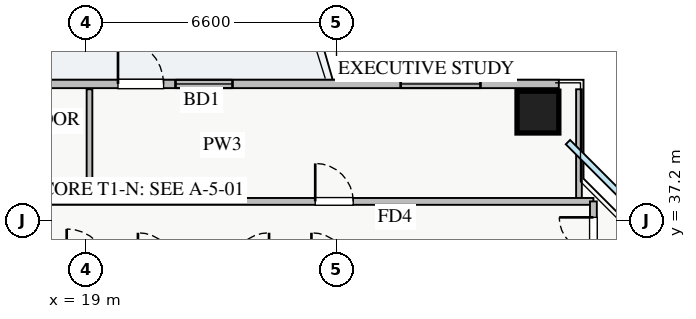
"""IFC4 building model, lengths in metres.
Left out: names, types, materials, properties, quantities, classifications, styles, units other than length and angle.
Written with IfcOpenShell. Run it as: python <this file> out.ifc"""

import sys

from ifc_helpers import new_model, si_unit, direction, frame, frame_2d, origin, origin_2d, place, context, subcontext, project, spatial, rectangle, extrude, source, transform, mapped, element, fill, save


model = new_model("IFC4")
c1 = context("Model", 3, precision=1e-05, world=origin(), true_north=direction((0.0, 1.0)))
c2 = subcontext(c1, "Body", "Model", "MODEL_VIEW")
j1 = project(units=[si_unit("LENGTHUNIT", "METRE"), si_unit("PLANEANGLEUNIT", "RADIAN")], contexts=[c1])
p1 = place(None, origin())
s1 = spatial("IfcSite", under=j1, at=p1, CompositionType="ELEMENT")
p2 = place(p1, origin())
s2 = spatial("IfcBuilding", under=s1, at=p2, CompositionType="ELEMENT")
p3 = place(p2, frame((0.0, 0.0, 106.75)))
s3 = spatial("IfcBuildingStorey", under=s2, at=p3, CompositionType="ELEMENT", Elevation=106.75)
m1 = source(origin(), c2, "Body", "SweptSolid", [
    extrude(rectangle(XDim=1.1, YDim=1.1, at=origin_2d()), origin(), (0.0, 0.0, 1.0), 3.25),
])
p4 = place(p3, frame((30.9, 40.05, 0.0), z_axis=(0.0, 0.0, 1.0), x_axis=(1.0, 0.0, 0.0)))
e1 = element("IfcColumn", 1, at=p4, inside=s3, PredefinedType="COLUMN", context=c2, shape_type="MappedRepresentation", body=[
    mapped(m1, transform((0.0, 0.0, 0.0), x_axis=(1.0, 0.0, 0.0), y_axis=(0.0, 1.0, 0.0), z_axis=(0.0, 0.0, 1.0), scale=1.0)),
])
p5 = place(p3, frame((6.55, 40.79, 0.0), z_axis=(0.0, 0.0, 1.0), x_axis=(1.0, 0.0, 0.0)))
e2 = element("IfcWall", 2, at=p5, inside=s3, PredefinedType="STANDARD", context=c2, shape_type="SweptSolid", body=[
    extrude(rectangle(XDim=24.9, YDim=0.22, at=frame_2d((12.45, 0.0))), origin(), (0.0, 0.0, 1.0), 2.61),
])
p6 = place(p5, frame((13.3, 0.0, 0.0)))
e3 = element("IfcOpeningElement", 3, at=p6, cuts=e2, PredefinedType="OPENING", context=c2, shape_type="SweptSolid", body=[
    extrude(rectangle(XDim=1.2, YDim=2.1, at=frame_2d((0.6, 1.05))), frame((0.0, 0.12, 0.0), z_axis=(0.0, -1.0, 0.0), x_axis=(1.0, 0.0, 0.0)), (0.0, 0.0, 1.0), 0.24),
])
p7 = place(p5, frame((0.357, 0.0, 0.9)))
e4 = element("IfcOpeningElement", 4, at=p7, cuts=e2, PredefinedType="OPENING", context=c2, shape_type="SweptSolid", body=[
    extrude(rectangle(XDim=1.5, YDim=1.5, at=frame_2d((0.75, 0.75))), frame((0.0, 0.12, 0.0), z_axis=(0.0, -1.0, 0.0), x_axis=(1.0, 0.0, 0.0)), (0.0, 0.0, 1.0), 0.24),
])
p8 = place(p5, frame((8.438, 0.0, 0.9)))
e5 = element("IfcOpeningElement", 5, at=p8, cuts=e2, PredefinedType="OPENING", context=c2, shape_type="SweptSolid", body=[
    extrude(rectangle(XDim=1.8, YDim=1.45, at=frame_2d((0.9, 0.725))), frame((0.0, 0.12, 0.0), z_axis=(0.0, -1.0, 0.0), x_axis=(1.0, 0.0, 0.0)), (0.0, 0.0, 1.0), 0.24),
])
p9 = place(p5, frame((14.813, 0.0, 0.9)))
e6 = element("IfcOpeningElement", 6, at=p9, cuts=e2, PredefinedType="OPENING", context=c2, shape_type="SweptSolid", body=[
    extrude(rectangle(XDim=1.5, YDim=1.45, at=frame_2d((0.75, 0.725))), frame((0.0, 0.12, 0.0), z_axis=(0.0, -1.0, 0.0), x_axis=(1.0, 0.0, 0.0)), (0.0, 0.0, 1.0), 0.24),
])
p10 = place(p5, frame((20.738, 0.0, 0.9)))
e7 = element("IfcOpeningElement", 7, at=p10, cuts=e2, PredefinedType="OPENING", context=c2, shape_type="SweptSolid", body=[
    extrude(rectangle(XDim=2.1, YDim=1.48, at=frame_2d((1.05, 0.74))), frame((0.0, 0.12, 0.0), z_axis=(0.0, -1.0, 0.0), x_axis=(1.0, 0.0, 0.0)), (0.0, 0.0, 1.0), 0.24),
])
p11 = place(p5, frame((4.136, 0.0, 0.9)))
e8 = element("IfcOpeningElement", 8, at=p11, cuts=e2, PredefinedType="OPENING", context=c2, shape_type="SweptSolid", body=[
    extrude(rectangle(XDim=2.4, YDim=1.5, at=frame_2d((1.2, 0.75))), frame((0.0, 0.12, 0.0), z_axis=(0.0, -1.0, 0.0), x_axis=(1.0, 0.0, 0.0)), (0.0, 0.0, 1.0), 0.24),
])
p12 = place(p3, frame((19.1, 37.7, 0.0), z_axis=(0.0, 0.0, 1.0), x_axis=(0.0, 1.0, 0.0)))
e9 = element("IfcWall", 9, at=p12, inside=s3, PredefinedType="PARTITIONING", context=c2, shape_type="SweptSolid", body=[
    extrude(rectangle(XDim=2.95, YDim=0.15, at=frame_2d((1.475, 0.0))), origin(), (0.0, 0.0, 1.0), 2.715),
])
p13 = place(p3, frame((31.98, 37.7, 0.0), z_axis=(0.0, 0.0, 1.0), x_axis=(0.0, 1.0, 0.0)))
e10 = element("IfcWall", 10, at=p13, inside=s3, PredefinedType="PARTITIONING", context=c2, shape_type="SweptSolid", body=[
    extrude(rectangle(XDim=2.95, YDim=0.15, at=frame_2d((1.475, 0.0))), origin(), (0.0, 0.0, 1.0), 3.07),
])
p14 = place(p3, frame((8.75, 37.7, 0.0), z_axis=(0.0, 0.0, 1.0), x_axis=(1.0, 0.0, 0.0)))
e11 = element("IfcWall", 11, at=p14, inside=s3, PredefinedType="PARTITIONING", context=c2, shape_type="SweptSolid", body=[
    extrude(rectangle(XDim=23.61, YDim=0.18, at=frame_2d((11.805, 0.0))), origin(), (0.0, 0.0, 1.0), 3.07),
])
p15 = place(p14, frame((4.675, 0.0, 0.0)))
e12 = element("IfcOpeningElement", 12, at=p15, cuts=e11, PredefinedType="OPENING", context=c2, shape_type="SweptSolid", body=[
    extrude(rectangle(XDim=1.0, YDim=2.05, at=frame_2d((0.5, 1.025))), frame((0.0, 0.1, 0.0), z_axis=(0.0, -1.0, 0.0), x_axis=(1.0, 0.0, 0.0)), (0.0, 0.0, 1.0), 0.2),
])
p16 = place(p14, frame((16.29, 0.0, 0.0)))
e13 = element("IfcOpeningElement", 13, at=p16, cuts=e11, PredefinedType="OPENING", context=c2, shape_type="SweptSolid", body=[
    extrude(rectangle(XDim=1.0, YDim=2.05, at=frame_2d((0.5, 1.025))), frame((0.0, 0.1, 0.0), z_axis=(0.0, -1.0, 0.0), x_axis=(1.0, 0.0, 0.0)), (0.0, 0.0, 1.0), 0.2),
])
p17 = place(p3, frame((32.36, 8.3, 0.0), z_axis=(0.0, 0.0, 1.0), x_axis=(0.0, 1.0, 0.0)))
e14 = element("IfcWall", 14, at=p17, inside=s3, PredefinedType="PARTITIONING", context=c2, shape_type="SweptSolid", body=[
    extrude(rectangle(XDim=29.4, YDim=0.18, at=frame_2d((14.7, 0.0))), origin(), (0.0, 0.0, 1.0), 3.07),
])
p18 = place(p17, frame((28.08, 0.0, 0.0)))
e15 = element("IfcOpeningElement", 15, at=p18, cuts=e14, PredefinedType="OPENING", context=c2, shape_type="SweptSolid", body=[
    extrude(rectangle(XDim=0.9, YDim=2.05, at=frame_2d((0.45, 1.025))), frame((0.0, 0.1, 0.0), z_axis=(0.0, -1.0, 0.0), x_axis=(1.0, 0.0, 0.0)), (0.0, 0.0, 1.0), 0.2),
])
p19 = place(p17, frame((0.42, 0.0, 0.0)))
e16 = element("IfcOpeningElement", 16, at=p19, cuts=e14, PredefinedType="OPENING", context=c2, shape_type="SweptSolid", body=[
    extrude(rectangle(XDim=0.9, YDim=2.05, at=frame_2d((0.45, 1.025))), frame((0.0, 0.1, 0.0), z_axis=(0.0, -1.0, 0.0), x_axis=(1.0, 0.0, 0.0)), (0.0, 0.0, 1.0), 0.2),
])
p20 = place(p17, frame((4.395, 0.0, 0.0)))
e17 = element("IfcOpeningElement", 17, at=p20, cuts=e14, PredefinedType="OPENING", context=c2, shape_type="SweptSolid", body=[
    extrude(rectangle(XDim=1.0, YDim=2.05, at=frame_2d((0.5, 1.025))), frame((0.0, 0.1, 0.0), z_axis=(0.0, -1.0, 0.0), x_axis=(1.0, 0.0, 0.0)), (0.0, 0.0, 1.0), 0.2),
])
p21 = place(p17, frame((17.135, 0.0, 0.0)))
e18 = element("IfcOpeningElement", 18, at=p21, cuts=e14, PredefinedType="OPENING", context=c2, shape_type="SweptSolid", body=[
    extrude(rectangle(XDim=1.0, YDim=2.05, at=frame_2d((0.5, 1.025))), frame((0.0, 0.1, 0.0), z_axis=(0.0, -1.0, 0.0), x_axis=(1.0, 0.0, 0.0)), (0.0, 0.0, 1.0), 0.2),
])
m2 = source(origin(), c2, "Body", "SweptSolid", [
    extrude(rectangle(XDim=1.2, YDim=2.1, at=frame_2d((0.6, 1.05))), frame((0.0, 0.025, 0.0), z_axis=(0.0, -1.0, 0.0), x_axis=(1.0, 0.0, 0.0)), (0.0, 0.0, 1.0), 0.05),
])
p22 = place(p6, origin())
e19 = element("IfcDoor", 19, at=p22, inside=s3, OperationType="SINGLE_SWING_LEFT", PredefinedType="DOOR", context=c2, shape_type="MappedRepresentation", body=[
    mapped(m2, transform((0.0, 0.0, 0.0), x_axis=(1.0, 0.0, 0.0), y_axis=(0.0, 1.0, 0.0), z_axis=(0.0, 0.0, 1.0), scale=1.0)),
])
fill(e3, e19)
m3 = source(origin(), c2, "Body", "SweptSolid", [
    extrude(rectangle(XDim=1.5, YDim=1.45, at=frame_2d((0.75, 0.725))), frame((0.0, 0.03, 0.0), z_axis=(0.0, -1.0, 0.0), x_axis=(1.0, 0.0, 0.0)), (0.0, 0.0, 1.0), 0.06),
])
p23 = place(p9, origin())
e20 = element("IfcWindow", 20, at=p23, inside=s3, PartitioningType="DOUBLE_PANEL_VERTICAL", PredefinedType="WINDOW", context=c2, shape_type="MappedRepresentation", body=[
    mapped(m3, transform((0.0, 0.0, 0.0), x_axis=(1.0, 0.0, 0.0), y_axis=(0.0, 1.0, 0.0), z_axis=(0.0, 0.0, 1.0), scale=1.0)),
])
fill(e6, e20)
m4 = source(origin(), c2, "Body", "SweptSolid", [
    extrude(rectangle(XDim=2.1, YDim=1.48, at=frame_2d((1.05, 0.74))), frame((0.0, 0.03, 0.0), z_axis=(0.0, -1.0, 0.0), x_axis=(1.0, 0.0, 0.0)), (0.0, 0.0, 1.0), 0.06),
])
p24 = place(p10, origin())
e21 = element("IfcWindow", 21, at=p24, inside=s3, PartitioningType="TRIPLE_PANEL_VERTICAL", PredefinedType="WINDOW", context=c2, shape_type="MappedRepresentation", body=[
    mapped(m4, transform((0.0, 0.0, 0.0), x_axis=(1.0, 0.0, 0.0), y_axis=(0.0, 1.0, 0.0), z_axis=(0.0, 0.0, 1.0), scale=1.0)),
])
fill(e7, e21)
m5 = source(origin(), c2, "Body", "SweptSolid", [
    extrude(rectangle(XDim=1.0, YDim=2.05, at=frame_2d((0.5, 1.025))), frame((0.0, 0.025, 0.0), z_axis=(0.0, -1.0, 0.0), x_axis=(1.0, 0.0, 0.0)), (0.0, 0.0, 1.0), 0.05),
])
p25 = place(p16, origin())
e22 = element("IfcDoor", 22, at=p25, inside=s3, OperationType="SINGLE_SWING_LEFT", PredefinedType="DOOR", context=c2, shape_type="MappedRepresentation", body=[
    mapped(m5, transform((0.0, 0.0, 0.0), x_axis=(1.0, 0.0, 0.0), y_axis=(0.0, 1.0, 0.0), z_axis=(0.0, 0.0, 1.0), scale=1.0)),
])
fill(e13, e22)
m6 = source(origin(), c2, "Body", "SweptSolid", [
    extrude(rectangle(XDim=0.9, YDim=2.05, at=frame_2d((0.45, 1.025))), frame((0.0, 0.025, 0.0), z_axis=(0.0, -1.0, 0.0), x_axis=(1.0, 0.0, 0.0)), (0.0, 0.0, 1.0), 0.05),
])
p26 = place(p18, origin())
e23 = element("IfcDoor", 23, at=p26, inside=s3, OperationType="SINGLE_SWING_RIGHT", PredefinedType="DOOR", context=c2, shape_type="MappedRepresentation", body=[
    mapped(m6, transform((0.0, 0.0, 0.0), x_axis=(1.0, 0.0, 0.0), y_axis=(0.0, 1.0, 0.0), z_axis=(0.0, 0.0, 1.0), scale=1.0)),
])
fill(e15, e23)
save(model, sys.argv[1])
